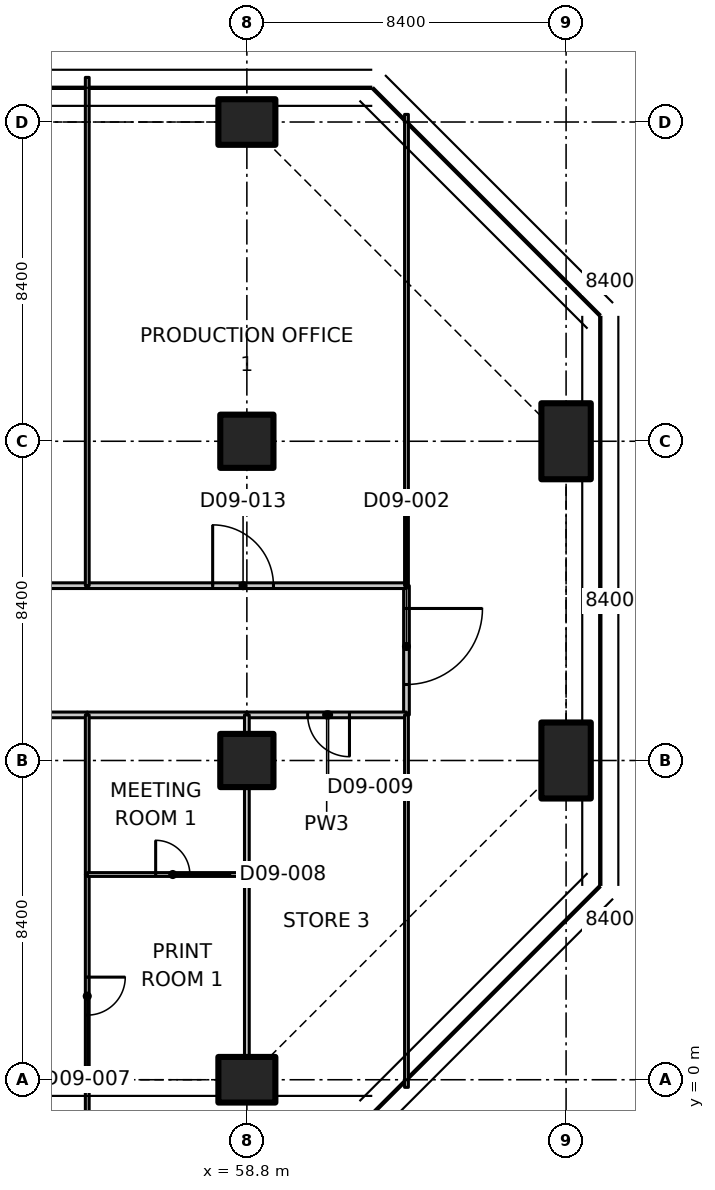
"""IFC4 building model, lengths in metres.
Left out: names, types, materials, properties, quantities, classifications, styles, units other than length and angle.
Written with IfcOpenShell. Run it as: python <this file> out.ifc"""

import sys

from ifc_helpers import new_model, si_unit, direction, frame, frame_2d, origin, origin_2d, place, context, subcontext, project, spatial, polyline, rectangle, outline, extrude, element, fill, save


model = new_model("IFC4")
c1 = context("Model", 3, precision=1e-05, world=origin(), true_north=direction((0.0, 1.0)))
c2 = subcontext(c1, "Body", "Model", "MODEL_VIEW")
j1 = project(units=[si_unit("LENGTHUNIT", "METRE"), si_unit("PLANEANGLEUNIT", "RADIAN")], contexts=[c1])
p1 = place(None, origin())
s1 = spatial("IfcSite", under=j1, at=p1, CompositionType="ELEMENT")
p2 = place(p1, origin())
s2 = spatial("IfcBuilding", under=s1, at=p2, CompositionType="ELEMENT")
p3 = place(p2, frame((0.0, 0.0, 65.3)))
s3 = spatial("IfcBuildingStorey", under=s2, at=p3, CompositionType="ELEMENT", Elevation=65.3)
p4 = place(p3, frame((58.8, 0.0, 0.0), z_axis=(0.0, 0.0, 1.0), x_axis=(0.0, 1.0, 0.0)))
e1 = element("IfcColumn", 1, at=p4, inside=s3, PredefinedType="COLUMN", context=c2, shape_type="SweptSolid", body=[
    extrude(rectangle(XDim=1.2, YDim=1.5, at=origin_2d()), origin(), (0.0, 0.0, 1.0), 3.35),
])
for number, where, z_axis, x_axis in (
    (2, (58.8, 8.4, 0.0), (0.0, 0.0, 1.0), (1.0, 0.0, 0.0)),
    (3, (58.8, 16.8, 0.0), (0.0, 0.0, 1.0), (1.0, 0.0, 0.0)),
):
    element("IfcColumn", number, at=place(p3, frame(where, z_axis=z_axis, x_axis=x_axis)), inside=s3, PredefinedType="COLUMN", context=c2, shape_type="SweptSolid", body=[
        extrude(rectangle(XDim=1.4, YDim=1.4, at=origin_2d()), origin(), (0.0, 0.0, 1.0), 3.35),
    ])
p5 = place(p3, frame((58.8, 25.2, 0.0), z_axis=(0.0, 0.0, 1.0), x_axis=(0.0, 1.0, 0.0)))
e4 = element("IfcColumn", 4, at=p5, inside=s3, PredefinedType="COLUMN", context=c2, shape_type="SweptSolid", body=[
    extrude(rectangle(XDim=1.2, YDim=1.5, at=origin_2d()), origin(), (0.0, 0.0, 1.0), 3.35),
])
for number, where, z_axis, x_axis in (
    (5, (67.2, 8.4, 0.0), (0.0, 0.0, 1.0), (1.0, 0.0, 0.0)),
    (6, (67.2, 16.8, 0.0), (0.0, 0.0, 1.0), (1.0, 0.0, 0.0)),
):
    element("IfcColumn", number, at=place(p3, frame(where, z_axis=z_axis, x_axis=x_axis)), inside=s3, PredefinedType="COLUMN", context=c2, shape_type="SweptSolid", body=[
        extrude(rectangle(XDim=1.3, YDim=2.0, at=origin_2d()), origin(), (0.0, 0.0, 1.0), 3.35),
    ])
p6 = place(p3, frame((63.0, 13.0, 0.0), z_axis=(0.0, 0.0, 1.0), x_axis=(0.0, -1.0, 0.0)))
e7 = element("IfcWall", 7, at=p6, inside=s3, PredefinedType="PARTITIONING", context=c2, shape_type="SweptSolid", body=[
    extrude(rectangle(XDim=3.4, YDim=0.15, at=frame_2d((1.7, 0.0))), origin(), (0.0, 0.0, 1.0), 3.33),
])
p7 = place(p6, frame((0.6, 0.0, 0.0)))
e8 = element("IfcOpeningElement", 8, at=p7, cuts=e7, PredefinedType="OPENING", context=c2, shape_type="SweptSolid", body=[
    extrude(rectangle(XDim=2.0, YDim=2.4, at=frame_2d((1.0, 1.2))), frame((0.0, 0.085, 0.0), z_axis=(0.0, -1.0, 0.0), x_axis=(1.0, 0.0, 0.0)), (0.0, 0.0, 1.0), 0.17),
])
p8 = place(p3, frame((54.6, 9.6, 0.0), z_axis=(0.0, 0.0, 1.0), x_axis=(-1.0, 0.0, 0.0)))
e9 = element("IfcWall", 9, at=p8, inside=s3, PredefinedType="PARTITIONING", context=c2, shape_type="SweptSolid", body=[
    extrude(rectangle(XDim=12.6, YDim=0.15, at=frame_2d((6.3, 0.0))), origin(), (0.0, 0.0, 1.0), 3.33),
])
p9 = place(p8, frame((5.4, 0.0, 0.0)))
e10 = element("IfcOpeningElement", 10, at=p9, cuts=e9, PredefinedType="OPENING", context=c2, shape_type="SweptSolid", body=[
    extrude(rectangle(XDim=1.8, YDim=2.1, at=frame_2d((0.9, 1.05))), frame((0.0, 0.085, 0.0), z_axis=(0.0, -1.0, 0.0), x_axis=(1.0, 0.0, 0.0)), (0.0, 0.0, 1.0), 0.17),
])
p10 = place(p3, frame((58.8, 9.6, 0.0), z_axis=(0.0, 0.0, 1.0), x_axis=(-1.0, 0.0, 0.0)))
e11 = element("IfcWall", 11, at=p10, inside=s3, PredefinedType="PARTITIONING", context=c2, shape_type="SweptSolid", body=[
    extrude(rectangle(XDim=4.2, YDim=0.15, at=frame_2d((2.1, 0.0))), origin(), (0.0, 0.0, 1.0), 3.33),
])
p11 = place(p3, frame((63.0, 9.6, 0.0), z_axis=(0.0, 0.0, 1.0), x_axis=(-1.0, 0.0, 0.0)))
e12 = element("IfcWall", 12, at=p11, inside=s3, PredefinedType="PARTITIONING", context=c2, shape_type="SweptSolid", body=[
    extrude(rectangle(XDim=4.2, YDim=0.15, at=frame_2d((2.1, 0.0))), origin(), (0.0, 0.0, 1.0), 3.33),
])
p12 = place(p11, frame((1.5, 0.0, 0.0)))
e13 = element("IfcOpeningElement", 13, at=p12, cuts=e12, PredefinedType="OPENING", context=c2, shape_type="SweptSolid", body=[
    extrude(rectangle(XDim=1.1, YDim=2.1, at=frame_2d((0.55, 1.05))), frame((0.0, 0.085, 0.0), z_axis=(0.0, -1.0, 0.0), x_axis=(1.0, 0.0, 0.0)), (0.0, 0.0, 1.0), 0.17),
])
p13 = place(p3, frame((49.4, 13.0, 0.0), z_axis=(0.0, 0.0, 1.0), x_axis=(1.0, 0.0, 0.0)))
e14 = element("IfcWall", 14, at=p13, inside=s3, PredefinedType="PARTITIONING", context=c2, shape_type="SweptSolid", body=[
    extrude(rectangle(XDim=5.2, YDim=0.15, at=frame_2d((2.6, 0.0))), origin(), (0.0, 0.0, 1.0), 3.33),
])
p14 = place(p3, frame((54.6, 13.0, 0.0), z_axis=(0.0, 0.0, 1.0), x_axis=(1.0, 0.0, 0.0)))
e15 = element("IfcWall", 15, at=p14, inside=s3, PredefinedType="PARTITIONING", context=c2, shape_type="SweptSolid", body=[
    extrude(rectangle(XDim=8.4, YDim=0.15, at=frame_2d((4.2, 0.0))), origin(), (0.0, 0.0, 1.0), 3.33),
])
p15 = place(p14, frame((3.3, 0.0, 0.0)))
e16 = element("IfcOpeningElement", 16, at=p15, cuts=e15, PredefinedType="OPENING", context=c2, shape_type="SweptSolid", body=[
    extrude(rectangle(XDim=1.6, YDim=2.1, at=frame_2d((0.8, 1.05))), frame((0.0, 0.085, 0.0), z_axis=(0.0, -1.0, 0.0), x_axis=(1.0, 0.0, 0.0)), (0.0, 0.0, 1.0), 0.17),
])
p16 = place(p3, frame((63.0, -0.2, 0.0), z_axis=(0.0, 0.0, 1.0), x_axis=(0.0, 1.0, 0.0)))
e17 = element("IfcWall", 17, at=p16, inside=s3, PredefinedType="PARTITIONING", context=c2, shape_type="SweptSolid", body=[
    extrude(outline(polyline([(0.0, 0.0), (9.8, 0.0), (9.8, 3.33), (5.066, 3.33), (5.064, 2.98), (3.736, 2.98), (3.734, 3.33), (0.0, 3.33), (0.0, 0.0)])), frame((0.0, 0.05, 0.0), z_axis=(0.0, -1.0, 0.0), x_axis=(1.0, 0.0, 0.0)), (0.0, 0.0, 1.0), 0.1),
])
p17 = place(p3, frame((63.0, 13.0, 0.0), z_axis=(0.0, 0.0, 1.0), x_axis=(0.0, 1.0, 0.0)))
e18 = element("IfcWall", 18, at=p17, inside=s3, PredefinedType="PARTITIONING", context=c2, shape_type="SweptSolid", body=[
    extrude(outline(polyline([(0.0, 0.0), (12.4, 0.0), (12.4, 3.33), (8.666, 3.33), (8.664, 2.98), (7.336, 2.98), (7.334, 3.33), (0.0, 3.33), (0.0, 0.0)])), frame((0.0, 0.05, 0.0), z_axis=(0.0, -1.0, 0.0), x_axis=(1.0, 0.0, 0.0)), (0.0, 0.0, 1.0), 0.1),
])
p18 = place(p3, frame((54.6, 5.4, 0.0), z_axis=(0.0, 0.0, 1.0), x_axis=(0.0, -1.0, 0.0)))
e19 = element("IfcWall", 19, at=p18, inside=s3, PredefinedType="PARTITIONING", context=c2, shape_type="SweptSolid", body=[
    extrude(outline(polyline([(0.0, 0.0), (6.765, 0.0), (6.765, 3.33), (6.5, 3.33), (5.85, 3.33), (5.848, 2.98), (4.952, 2.98), (4.95, 3.33), (0.0, 3.33), (0.0, 0.0)])), frame((0.0, 0.05, 0.0), z_axis=(0.0, -1.0, 0.0), x_axis=(1.0, 0.0, 0.0)), (0.0, 0.0, 1.0), 0.1),
])
p19 = place(p18, frame((2.7, 0.0, 0.0)))
e20 = element("IfcOpeningElement", 20, at=p19, cuts=e19, PredefinedType="OPENING", context=c2, shape_type="SweptSolid", body=[
    extrude(rectangle(XDim=1.0, YDim=2.1, at=frame_2d((0.5, 1.05))), frame((0.0, 0.06, 0.0), z_axis=(0.0, -1.0, 0.0), x_axis=(1.0, 0.0, 0.0)), (0.0, 0.0, 1.0), 0.12),
])
p20 = place(p3, frame((54.6, 9.6, 0.0), z_axis=(0.0, 0.0, 1.0), x_axis=(0.0, -1.0, 0.0)))
e21 = element("IfcWall", 21, at=p20, inside=s3, PredefinedType="PARTITIONING", context=c2, shape_type="SweptSolid", body=[
    extrude(rectangle(XDim=4.2, YDim=0.1, at=frame_2d((2.1, 0.0))), origin(), (0.0, 0.0, 1.0), 3.33),
])
p21 = place(p3, frame((54.6, 5.4, 0.0), z_axis=(0.0, 0.0, 1.0), x_axis=(1.0, 0.0, 0.0)))
e22 = element("IfcWall", 22, at=p21, inside=s3, PredefinedType="PARTITIONING", context=c2, shape_type="SweptSolid", body=[
    extrude(rectangle(XDim=4.2, YDim=0.1, at=frame_2d((2.1, 0.0))), origin(), (0.0, 0.0, 1.0), 3.33),
])
p22 = place(p21, frame((1.8, 0.0, 0.0)))
e23 = element("IfcOpeningElement", 23, at=p22, cuts=e22, PredefinedType="OPENING", context=c2, shape_type="SweptSolid", body=[
    extrude(rectangle(XDim=0.9, YDim=2.1, at=frame_2d((0.45, 1.05))), frame((0.0, 0.06, 0.0), z_axis=(0.0, -1.0, 0.0), x_axis=(1.0, 0.0, 0.0)), (0.0, 0.0, 1.0), 0.12),
])
p23 = place(p3, frame((58.8, 5.4, 0.0), z_axis=(0.0, 0.0, 1.0), x_axis=(0.0, -1.0, 0.0)))
e24 = element("IfcWall", 24, at=p23, inside=s3, PredefinedType="PARTITIONING", context=c2, shape_type="SweptSolid", body=[
    extrude(rectangle(XDim=4.78, YDim=0.125, at=frame_2d((2.39, 0.0))), origin(), (0.0, 0.0, 1.0), 3.33),
])
p24 = place(p3, frame((58.8, 9.6, 0.0), z_axis=(0.0, 0.0, 1.0), x_axis=(0.0, -1.0, 0.0)))
e25 = element("IfcWall", 25, at=p24, inside=s3, PredefinedType="PARTITIONING", context=c2, shape_type="SweptSolid", body=[
    extrude(rectangle(XDim=0.48, YDim=0.125, at=frame_2d((0.24, 0.0))), origin(), (0.0, 0.0, 1.0), 3.33),
])
p25 = place(p3, frame((58.8, 7.68, 0.0), z_axis=(0.0, 0.0, 1.0), x_axis=(0.0, -1.0, 0.0)))
e26 = element("IfcWall", 26, at=p25, inside=s3, PredefinedType="PARTITIONING", context=c2, shape_type="SweptSolid", body=[
    extrude(rectangle(XDim=2.28, YDim=0.125, at=frame_2d((1.14, 0.0))), origin(), (0.0, 0.0, 1.0), 3.33),
])
p26 = place(p3, frame((54.6, 26.374, 0.0), z_axis=(0.0, 0.0, 1.0), x_axis=(0.0, -1.0, 0.0)))
e27 = element("IfcWall", 27, at=p26, inside=s3, PredefinedType="PARTITIONING", context=c2, shape_type="SweptSolid", body=[
    extrude(outline(polyline([(0.0, 0.0), (13.374, 0.0), (13.374, 3.33), (1.624, 3.33), (1.622, 2.98), (0.726, 2.98), (0.724, 3.33), (0.074, 3.33), (0.0, 3.33), (0.0, 0.0)])), frame((0.0, 0.05, 0.0), z_axis=(0.0, -1.0, 0.0), x_axis=(1.0, 0.0, 0.0)), (0.0, 0.0, 1.0), 0.1),
])
p27 = place(p7, origin())
e28 = element("IfcDoor", 28, at=p27, inside=s3, OperationType="DOUBLE_DOOR_SINGLE_SWING", PredefinedType="DOOR", context=c2, shape_type="SweptSolid", body=[
    extrude(rectangle(XDim=2.0, YDim=2.4, at=frame_2d((1.0, 1.2))), frame((0.0, 0.025, 0.0), z_axis=(0.0, -1.0, 0.0), x_axis=(1.0, 0.0, 0.0)), (0.0, 0.0, 1.0), 0.05),
])
fill(e8, e28)
p28 = place(p19, origin())
e29 = element("IfcDoor", 29, at=p28, inside=s3, OperationType="SINGLE_SWING_LEFT", PredefinedType="DOOR", context=c2, shape_type="SweptSolid", body=[
    extrude(rectangle(XDim=1.0, YDim=2.1, at=frame_2d((0.5, 1.05))), frame((0.0, 0.025, 0.0), z_axis=(0.0, -1.0, 0.0), x_axis=(1.0, 0.0, 0.0)), (0.0, 0.0, 1.0), 0.05),
])
fill(e20, e29)
p29 = place(p22, origin())
e30 = element("IfcDoor", 30, at=p29, inside=s3, OperationType="SINGLE_SWING_LEFT", PredefinedType="DOOR", context=c2, shape_type="SweptSolid", body=[
    extrude(rectangle(XDim=0.9, YDim=2.1, at=frame_2d((0.45, 1.05))), frame((0.0, 0.025, 0.0), z_axis=(0.0, -1.0, 0.0), x_axis=(1.0, 0.0, 0.0)), (0.0, 0.0, 1.0), 0.05),
])
fill(e23, e30)
p30 = place(p12, origin())
e31 = element("IfcDoor", 31, at=p30, inside=s3, OperationType="SINGLE_SWING_LEFT", PredefinedType="DOOR", context=c2, shape_type="SweptSolid", body=[
    extrude(rectangle(XDim=1.1, YDim=2.1, at=frame_2d((0.55, 1.05))), frame((0.0, 0.025, 0.0), z_axis=(0.0, -1.0, 0.0), x_axis=(1.0, 0.0, 0.0)), (0.0, 0.0, 1.0), 0.05),
])
fill(e13, e31)
p31 = place(p15, origin())
e32 = element("IfcDoor", 32, at=p31, inside=s3, OperationType="DOUBLE_DOOR_SINGLE_SWING", PredefinedType="DOOR", context=c2, shape_type="SweptSolid", body=[
    extrude(rectangle(XDim=1.6, YDim=2.1, at=frame_2d((0.8, 1.05))), frame((0.0, 0.025, 0.0), z_axis=(0.0, -1.0, 0.0), x_axis=(1.0, 0.0, 0.0)), (0.0, 0.0, 1.0), 0.05),
])
fill(e16, e32)
save(model, sys.argv[1])
